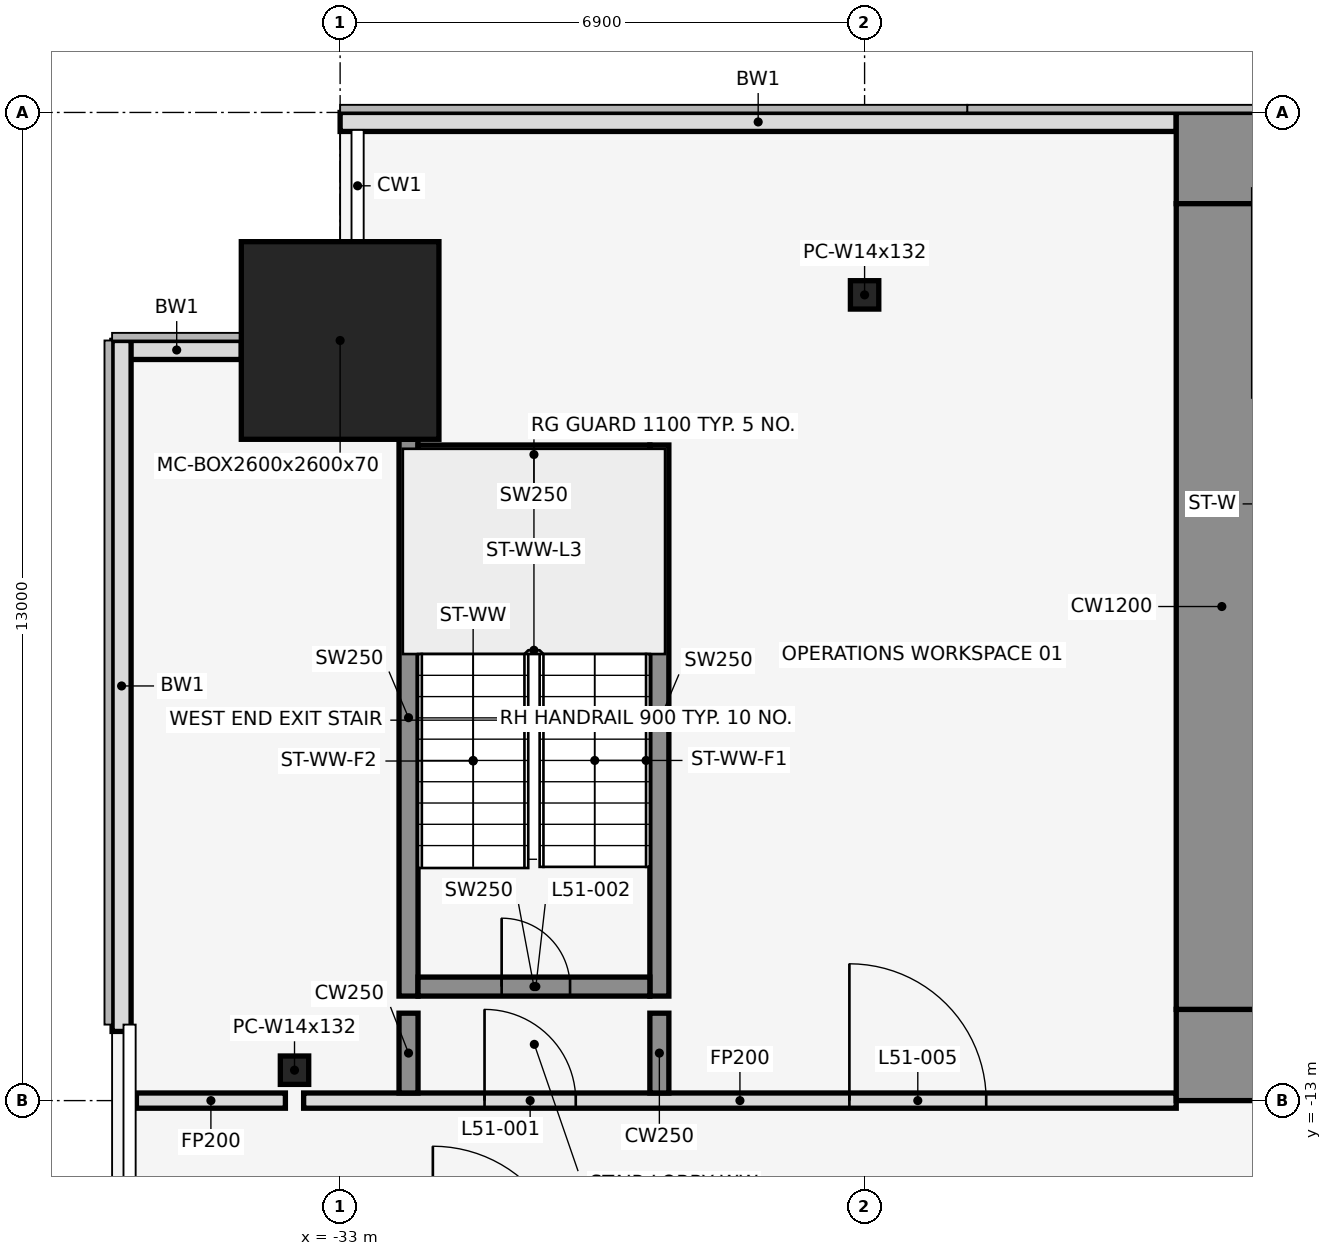
"""IFC4 building model, lengths in metres.
Left out: names, types, materials, properties, quantities, classifications, styles, units other than length and angle.
Written with IfcOpenShell. Run it as: python <this file> out.ifc"""

import sys

from ifc_helpers import new_model, si_unit, direction, frame, frame_2d, origin, origin_2d, place, context, subcontext, project, spatial, rectangle, hollow_rectangle, i_section, extrude, element, fill, save


model = new_model("IFC4")
c1 = context("Model", 3, precision=1e-05, world=origin(), true_north=direction((0.0, 1.0)))
c2 = subcontext(c1, "Body", "Model", "MODEL_VIEW")
j1 = project(units=[si_unit("LENGTHUNIT", "METRE"), si_unit("PLANEANGLEUNIT", "RADIAN")], contexts=[c1])
p1 = place(None, origin())
s1 = spatial("IfcSite", under=j1, at=p1, CompositionType="ELEMENT")
p2 = place(p1, origin())
s2 = spatial("IfcBuilding", under=s1, at=p2, CompositionType="ELEMENT")
p3 = place(p2, frame((0.0, 0.0, 227.8)))
s3 = spatial("IfcBuildingStorey", under=s2, at=p3, CompositionType="ELEMENT", Elevation=227.8)
p4 = place(p3, frame((-33.0, -3.0, 0.0), z_axis=(0.0, 0.0, 1.0), x_axis=(1.0, 0.0, 0.0)))
e1 = element("IfcColumn", 1, at=p4, inside=s3, PredefinedType="COLUMN", context=c2, shape_type="SweptSolid", body=[
    extrude(hollow_rectangle(XDim=2.6, YDim=2.6, WallThickness=0.07, at=origin_2d()), origin(), (0.0, 0.0, 1.0), 4.1),
])
for number, where, z_axis, x_axis in (
    (2, (-26.1, -2.4, 0.0), (0.0, 0.0, 1.0), (1.0, 0.0, 0.0)),
    (3, (-33.6, -12.6, 0.0), (0.0, 0.0, 1.0), (1.0, 0.0, 0.0)),
):
    element("IfcColumn", number, at=place(p3, frame(where, z_axis=z_axis, x_axis=x_axis)), inside=s3, PredefinedType="COLUMN", context=c2, shape_type="SweptSolid", body=[
        extrude(i_section(OverallWidth=0.373, OverallDepth=0.373, WebThickness=0.016, FlangeThickness=0.026, at=origin_2d()), origin(), (0.0, 0.0, 1.0), 4.1),
    ])
p5 = place(p3, frame((-22.0, -0.125, 0.0), z_axis=(0.0, 0.0, 1.0), x_axis=(-1.0, 0.0, 0.0)))
e4 = element("IfcWall", 4, at=p5, inside=s3, PredefinedType="STANDARD", context=c2, shape_type="SweptSolid", body=[
    extrude(rectangle(XDim=11.0, YDim=0.25, at=frame_2d((5.5, 0.0))), origin(), (0.0, 0.0, 1.0), 3.95),
])
p6 = place(p3, frame((-34.3, -3.125, 0.0), z_axis=(0.0, 0.0, 1.0), x_axis=(-1.0, 0.0, 0.0)))
e5 = element("IfcWall", 5, at=p6, inside=s3, PredefinedType="STANDARD", context=c2, shape_type="SweptSolid", body=[
    extrude(rectangle(XDim=1.7, YDim=0.25, at=frame_2d((0.85, 0.0))), origin(), (0.0, 0.0, 1.0), 3.95),
])
p7 = place(p3, frame((-35.875, -3.0, 0.0), z_axis=(0.0, 0.0, 1.0), x_axis=(0.0, -1.0, 0.0)))
e6 = element("IfcWall", 6, at=p7, inside=s3, PredefinedType="STANDARD", context=c2, shape_type="SweptSolid", body=[
    extrude(rectangle(XDim=9.09, YDim=0.25, at=frame_2d((4.545, 0.0))), origin(), (0.0, 0.0, 1.0), 3.95),
])
p8 = place(p3, frame((-32.1, -11.625, 0.0), z_axis=(0.0, 0.0, 1.0), x_axis=(0.0, 1.0, 0.0)))
e7 = element("IfcWall", 7, at=p8, inside=s3, PredefinedType="SHEAR", context=c2, shape_type="SweptSolid", body=[
    extrude(rectangle(XDim=7.325, YDim=0.25, at=frame_2d((3.663, 0.0))), origin(), (0.0, 0.0, 1.0), 4.1),
])
p9 = place(p3, frame((-28.8, -11.625, 0.0), z_axis=(0.0, 0.0, 1.0), x_axis=(0.0, 1.0, 0.0)))
e8 = element("IfcWall", 8, at=p9, inside=s3, PredefinedType="SHEAR", context=c2, shape_type="SweptSolid", body=[
    extrude(rectangle(XDim=7.25, YDim=0.25, at=frame_2d((3.625, 0.0))), origin(), (0.0, 0.0, 1.0), 4.1),
])
p10 = place(p3, frame((-31.975, -11.5, 0.0), z_axis=(0.0, 0.0, 1.0), x_axis=(1.0, 0.0, 0.0)))
e9 = element("IfcWall", 9, at=p10, inside=s3, PredefinedType="SHEAR", context=c2, shape_type="SweptSolid", body=[
    extrude(rectangle(XDim=3.05, YDim=0.25, at=frame_2d((1.525, 0.0))), origin(), (0.0, 0.0, 1.0), 4.1),
])
p11 = place(p10, frame((1.1, 0.0, 0.0)))
e10 = element("IfcOpeningElement", 10, at=p11, cuts=e9, PredefinedType="OPENING", context=c2, shape_type="SweptSolid", body=[
    extrude(rectangle(XDim=0.9, YDim=2.1, at=frame_2d((0.45, 1.05))), frame((0.0, 0.137, 0.0), z_axis=(0.0, -1.0, 0.0), x_axis=(1.0, 0.0, 0.0)), (0.0, 0.0, 1.0), 0.274),
])
p12 = place(p3, frame((-31.975, -4.5, 0.0), z_axis=(0.0, 0.0, 1.0), x_axis=(1.0, 0.0, 0.0)))
e11 = element("IfcWall", 11, at=p12, inside=s3, PredefinedType="SHEAR", context=c2, shape_type="SweptSolid", body=[
    extrude(rectangle(XDim=3.05, YDim=0.25, at=frame_2d((1.525, 0.0))), origin(), (0.0, 0.0, 1.0), 4.1),
])
p13 = place(p3, frame((-35.68, -13.0, 0.0), z_axis=(0.0, 0.0, 1.0), x_axis=(1.0, 0.0, 0.0)))
e12 = element("IfcWall", 12, at=p13, inside=s3, PredefinedType="PARTITIONING", context=c2, shape_type="SweptSolid", body=[
    extrude(rectangle(XDim=1.96, YDim=0.2, at=frame_2d((0.98, 0.0))), origin(), (0.0, 0.0, 1.0), 2.84),
])
p14 = place(p3, frame((-33.48, -13.0, 0.0), z_axis=(0.0, 0.0, 1.0), x_axis=(1.0, 0.0, 0.0)))
e13 = element("IfcWall", 13, at=p14, inside=s3, PredefinedType="PARTITIONING", context=c2, shape_type="SweptSolid", body=[
    extrude(rectangle(XDim=11.48, YDim=0.2, at=frame_2d((5.74, 0.0))), origin(), (0.0, 0.0, 1.0), 2.84),
])
p15 = place(p14, frame((2.38, 0.0, 0.0)))
e14 = element("IfcOpeningElement", 14, at=p15, cuts=e13, PredefinedType="OPENING", context=c2, shape_type="SweptSolid", body=[
    extrude(rectangle(XDim=1.2, YDim=2.1, at=frame_2d((0.6, 1.05))), frame((0.0, 0.112, 0.0), z_axis=(0.0, -1.0, 0.0), x_axis=(1.0, 0.0, 0.0)), (0.0, 0.0, 1.0), 0.224),
])
p16 = place(p14, frame((7.18, 0.0, 0.0)))
e15 = element("IfcOpeningElement", 15, at=p16, cuts=e13, PredefinedType="OPENING", context=c2, shape_type="SweptSolid", body=[
    extrude(rectangle(XDim=1.8, YDim=2.1, at=frame_2d((0.9, 1.05))), frame((0.0, 0.112, 0.0), z_axis=(0.0, -1.0, 0.0), x_axis=(1.0, 0.0, 0.0)), (0.0, 0.0, 1.0), 0.224),
])
for number, where, z_axis, x_axis in (
    (16, (-32.1, -12.9, 0.0), (0.0, 0.0, 1.0), (0.0, 1.0, 0.0)),
    (17, (-28.8, -12.9, 0.0), (0.0, 0.0, 1.0), (0.0, 1.0, 0.0)),
):
    element("IfcWall", number, at=place(p3, frame(where, z_axis=z_axis, x_axis=x_axis)), inside=s3, PredefinedType="SHEAR", context=c2, shape_type="SweptSolid", body=[
        extrude(rectangle(XDim=1.05, YDim=0.25, at=frame_2d((0.525, 0.0))), origin(), (0.0, 0.0, 1.0), 4.1),
    ])
p17 = place(p3, frame((-22.0, -0.6, 0.0), z_axis=(0.0, 0.0, 1.0), x_axis=(1.0, 0.0, 0.0)))
e18 = element("IfcWall", 18, at=p17, inside=s3, PredefinedType="SHEAR", context=c2, shape_type="SweptSolid", body=[
    extrude(rectangle(XDim=44.0, YDim=1.2, at=frame_2d((22.0, 0.0))), origin(), (0.0, 0.0, 1.0), 4.1),
])
p18 = place(p17, frame((18.55, 0.0, 0.0)))
e19 = element("IfcOpeningElement", 19, at=p18, cuts=e18, PredefinedType="OPENING", context=c2, shape_type="SweptSolid", body=[
    extrude(rectangle(XDim=0.9, YDim=2.1, at=frame_2d((0.45, 1.05))), frame((0.0, 0.612, 0.0), z_axis=(0.0, -1.0, 0.0), x_axis=(1.0, 0.0, 0.0)), (0.0, 0.0, 1.0), 1.224),
])
p19 = place(p17, frame((24.55, 0.0, 0.0)))
e20 = element("IfcOpeningElement", 20, at=p19, cuts=e18, PredefinedType="OPENING", context=c2, shape_type="SweptSolid", body=[
    extrude(rectangle(XDim=0.9, YDim=2.1, at=frame_2d((0.45, 1.05))), frame((0.0, 0.612, 0.0), z_axis=(0.0, -1.0, 0.0), x_axis=(1.0, 0.0, 0.0)), (0.0, 0.0, 1.0), 1.224),
])
p20 = place(p3, frame((-22.0, -12.4, 0.0), z_axis=(0.0, 0.0, 1.0), x_axis=(1.0, 0.0, 0.0)))
e21 = element("IfcWall", 21, at=p20, inside=s3, PredefinedType="SHEAR", context=c2, shape_type="SweptSolid", body=[
    extrude(rectangle(XDim=44.0, YDim=1.2, at=frame_2d((22.0, 0.0))), origin(), (0.0, 0.0, 1.0), 4.1),
])
p21 = place(p20, frame((2.2, 0.0, 0.0)))
e22 = element("IfcOpeningElement", 22, at=p21, cuts=e21, PredefinedType="OPENING", context=c2, shape_type="SweptSolid", body=[
    extrude(rectangle(XDim=1.2, YDim=2.1, at=frame_2d((0.6, 1.05))), frame((0.0, 0.612, 0.0), z_axis=(0.0, -1.0, 0.0), x_axis=(1.0, 0.0, 0.0)), (0.0, 0.0, 1.0), 1.224),
])
p22 = place(p20, frame((21.4, 0.0, 0.0)))
e23 = element("IfcOpeningElement", 23, at=p22, cuts=e21, PredefinedType="OPENING", context=c2, shape_type="SweptSolid", body=[
    extrude(rectangle(XDim=1.2, YDim=2.1, at=frame_2d((0.6, 1.05))), frame((0.0, 0.612, 0.0), z_axis=(0.0, -1.0, 0.0), x_axis=(1.0, 0.0, 0.0)), (0.0, 0.0, 1.0), 1.224),
])
p23 = place(p20, frame((40.6, 0.0, 0.0)))
e24 = element("IfcOpeningElement", 24, at=p23, cuts=e21, PredefinedType="OPENING", context=c2, shape_type="SweptSolid", body=[
    extrude(rectangle(XDim=1.2, YDim=2.1, at=frame_2d((0.6, 1.05))), frame((0.0, 0.612, 0.0), z_axis=(0.0, -1.0, 0.0), x_axis=(1.0, 0.0, 0.0)), (0.0, 0.0, 1.0), 1.224),
])
p24 = place(p20, frame((16.0, 0.0, 0.0)))
e25 = element("IfcOpeningElement", 25, at=p24, cuts=e21, PredefinedType="OPENING", context=c2, shape_type="SweptSolid", body=[
    extrude(rectangle(XDim=1.8, YDim=2.1, at=frame_2d((0.9, 1.05))), frame((0.0, 0.612, 0.0), z_axis=(0.0, -1.0, 0.0), x_axis=(1.0, 0.0, 0.0)), (0.0, 0.0, 1.0), 1.224),
])
p25 = place(p20, frame((6.3, 0.0, 0.0)))
e26 = element("IfcOpeningElement", 26, at=p25, cuts=e21, PredefinedType="OPENING", context=c2, shape_type="SweptSolid", body=[
    extrude(rectangle(XDim=1.2, YDim=2.1, at=frame_2d((0.6, 1.05))), frame((0.0, 0.612, 0.0), z_axis=(0.0, -1.0, 0.0), x_axis=(1.0, 0.0, 0.0)), (0.0, 0.0, 1.0), 1.224),
])
p26 = place(p20, frame((26.2, 0.0, 0.0)))
e27 = element("IfcOpeningElement", 27, at=p26, cuts=e21, PredefinedType="OPENING", context=c2, shape_type="SweptSolid", body=[
    extrude(rectangle(XDim=1.8, YDim=2.1, at=frame_2d((0.9, 1.05))), frame((0.0, 0.612, 0.0), z_axis=(0.0, -1.0, 0.0), x_axis=(1.0, 0.0, 0.0)), (0.0, 0.0, 1.0), 1.224),
])
p27 = place(p20, frame((36.5, 0.0, 0.0)))
e28 = element("IfcOpeningElement", 28, at=p27, cuts=e21, PredefinedType="OPENING", context=c2, shape_type="SweptSolid", body=[
    extrude(rectangle(XDim=1.2, YDim=2.1, at=frame_2d((0.6, 1.05))), frame((0.0, 0.612, 0.0), z_axis=(0.0, -1.0, 0.0), x_axis=(1.0, 0.0, 0.0)), (0.0, 0.0, 1.0), 1.224),
])
p28 = place(p3, frame((-21.4, -11.8, 0.0), z_axis=(0.0, 0.0, 1.0), x_axis=(0.0, 1.0, 0.0)))
e29 = element("IfcWall", 29, at=p28, inside=s3, PredefinedType="SHEAR", context=c2, shape_type="SweptSolid", body=[
    extrude(rectangle(XDim=10.6, YDim=1.2, at=frame_2d((5.3, 0.0))), origin(), (0.0, 0.0, 1.0), 4.1),
])
p29 = place(p15, origin())
e30 = element("IfcDoor", 30, at=p29, inside=s3, OperationType="SINGLE_SWING_LEFT", PredefinedType="DOOR", context=c2, shape_type="SweptSolid", body=[
    extrude(rectangle(XDim=1.2, YDim=2.1, at=frame_2d((0.6, 1.05))), frame((0.0, 0.025, 0.0), z_axis=(0.0, -1.0, 0.0), x_axis=(1.0, 0.0, 0.0)), (0.0, 0.0, 1.0), 0.05),
])
fill(e14, e30)
p30 = place(p11, origin())
e31 = element("IfcDoor", 31, at=p30, inside=s3, OperationType="SINGLE_SWING_LEFT", PredefinedType="DOOR", context=c2, shape_type="SweptSolid", body=[
    extrude(rectangle(XDim=0.9, YDim=2.1, at=frame_2d((0.45, 1.05))), frame((0.0, 0.025, 0.0), z_axis=(0.0, -1.0, 0.0), x_axis=(1.0, 0.0, 0.0)), (0.0, 0.0, 1.0), 0.05),
])
fill(e10, e31)
p31 = place(p16, origin())
e32 = element("IfcDoor", 32, at=p31, inside=s3, OperationType="SINGLE_SWING_LEFT", PredefinedType="DOOR", context=c2, shape_type="SweptSolid", body=[
    extrude(rectangle(XDim=1.8, YDim=2.1, at=frame_2d((0.9, 1.05))), frame((0.0, 0.025, 0.0), z_axis=(0.0, -1.0, 0.0), x_axis=(1.0, 0.0, 0.0)), (0.0, 0.0, 1.0), 0.05),
])
fill(e15, e32)
save(model, sys.argv[1])
